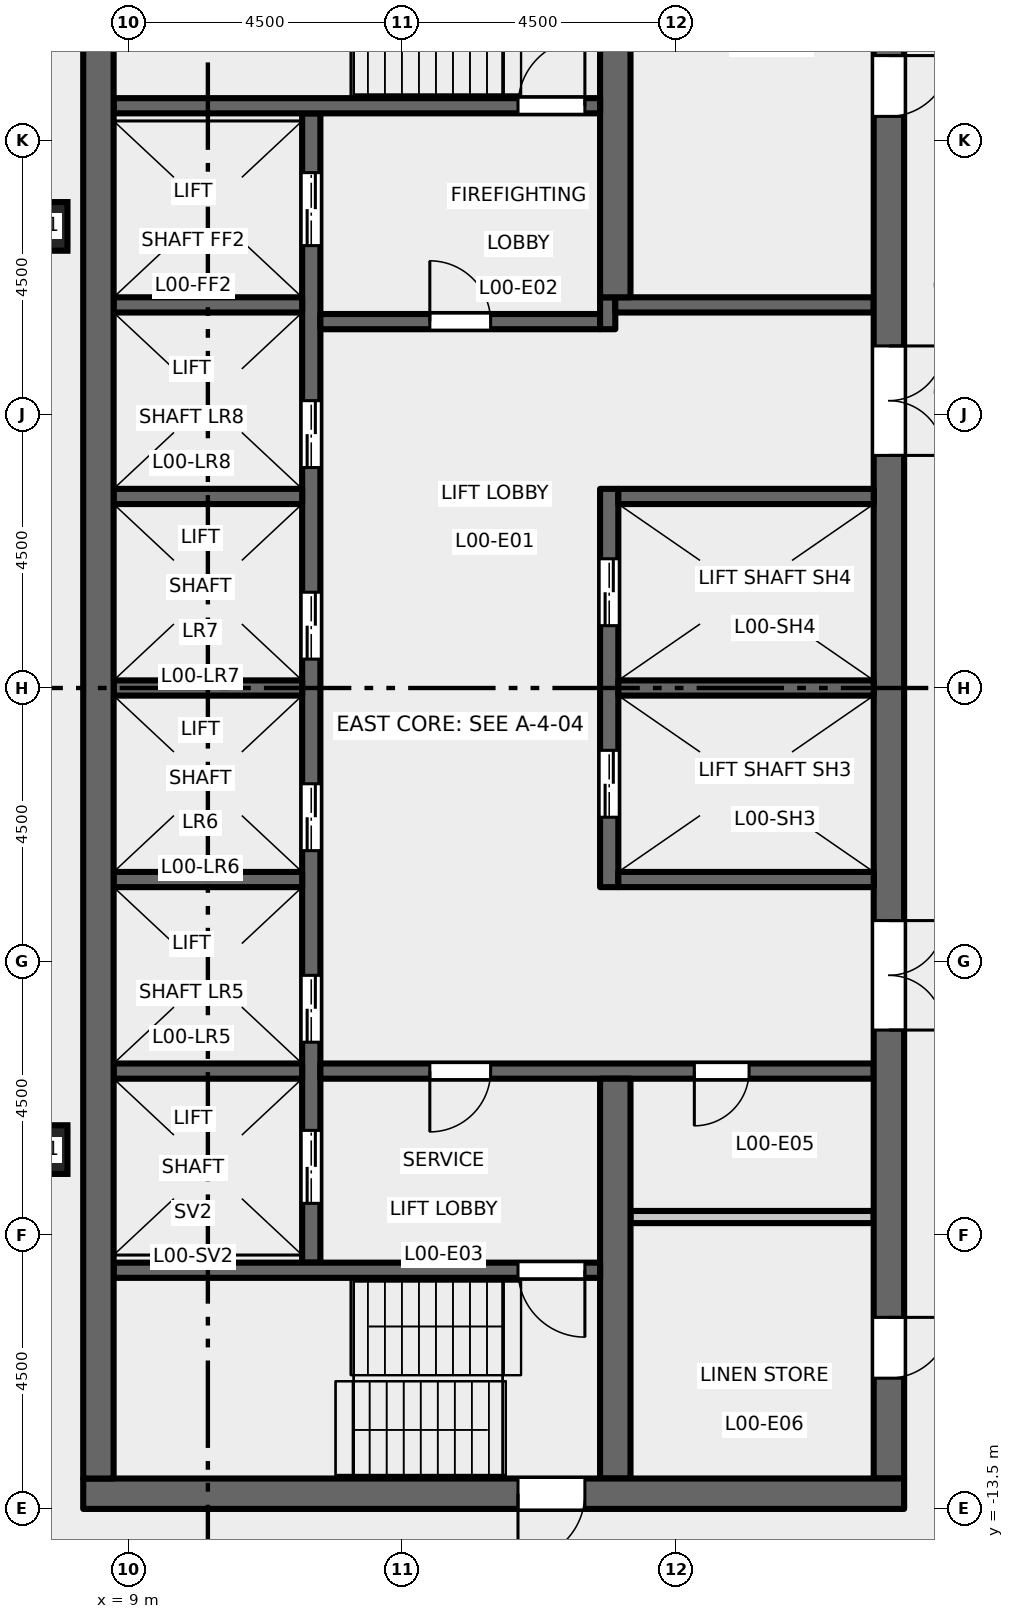
"""IFC4 building model, lengths in metres.
Left out: names, types, materials, properties, quantities, classifications, styles, units other than length and angle.
Written with IfcOpenShell. Run it as: python <this file> out.ifc"""

import sys

from ifc_helpers import new_model, si_unit, direction, frame, frame_2d, origin, origin_2d, place, context, subcontext, project, spatial, rectangle, hollow_rectangle, extrude, element, fill, save


model = new_model("IFC4")
c1 = context("Model", 3, precision=1e-05, world=origin(), true_north=direction((0.0, 1.0)))
c2 = subcontext(c1, "Body", "Model", "MODEL_VIEW")
j1 = project(units=[si_unit("LENGTHUNIT", "METRE"), si_unit("PLANEANGLEUNIT", "RADIAN")], contexts=[c1])
p1 = place(None, origin())
s1 = spatial("IfcSite", under=j1, at=p1, CompositionType="ELEMENT")
p2 = place(p1, origin())
s2 = spatial("IfcBuilding", under=s1, at=p2, CompositionType="ELEMENT")
p3 = place(p2, origin())
s3 = spatial("IfcBuildingStorey", under=s2, at=p3, CompositionType="ELEMENT", Elevation=0.0)
for number, where, z_axis, x_axis in (
    (1, (7.591, -7.591, 0.0), (0.0, 0.0, 1.0), (1.0, 0.0, 0.0)),
    (2, (7.591, 7.591, 0.0), (0.0, 0.0, 1.0), (1.0, 0.0, 0.0)),
):
    element("IfcColumn", number, at=place(p3, frame(where, z_axis=z_axis, x_axis=x_axis)), inside=s3, PredefinedType="COLUMN", context=c2, shape_type="SweptSolid", body=[
        extrude(hollow_rectangle(XDim=0.8, YDim=0.8, WallThickness=0.05, at=origin_2d()), origin(), (0.0, 0.0, 1.0), 7.2),
    ])
p4 = place(p3, frame((12.0, -9.45, 0.0), z_axis=(0.0, 0.0, 1.0), x_axis=(0.0, 1.0, 0.0)))
e3 = element("IfcWall", 3, at=p4, inside=s3, PredefinedType="SHEAR", context=c2, shape_type="SweptSolid", body=[
    extrude(rectangle(XDim=18.9, YDim=0.3, at=frame_2d((9.45, 0.0))), origin(), (0.0, 0.0, 1.0), 7.0),
])
p5 = place(p4, frame((3.625, 0.0, 0.0)))
e4 = element("IfcOpeningElement", 4, at=p5, cuts=e3, PredefinedType="OPENING", context=c2, shape_type="SweptSolid", body=[
    extrude(rectangle(XDim=1.1, YDim=2.1, at=frame_2d((0.55, 1.05))), frame((0.0, 0.16, 0.0), z_axis=(0.0, -1.0, 0.0), x_axis=(1.0, 0.0, 0.0)), (0.0, 0.0, 1.0), 0.32),
])
p6 = place(p4, frame((6.775, 0.0, 0.0)))
e5 = element("IfcOpeningElement", 5, at=p6, cuts=e3, PredefinedType="OPENING", context=c2, shape_type="SweptSolid", body=[
    extrude(rectangle(XDim=1.1, YDim=2.1, at=frame_2d((0.55, 1.05))), frame((0.0, 0.16, 0.0), z_axis=(0.0, -1.0, 0.0), x_axis=(1.0, 0.0, 0.0)), (0.0, 0.0, 1.0), 0.32),
])
p7 = place(p4, frame((9.925, 0.0, 0.0)))
e6 = element("IfcOpeningElement", 6, at=p7, cuts=e3, PredefinedType="OPENING", context=c2, shape_type="SweptSolid", body=[
    extrude(rectangle(XDim=1.1, YDim=2.1, at=frame_2d((0.55, 1.05))), frame((0.0, 0.16, 0.0), z_axis=(0.0, -1.0, 0.0), x_axis=(1.0, 0.0, 0.0)), (0.0, 0.0, 1.0), 0.32),
])
p8 = place(p4, frame((13.075, 0.0, 0.0)))
e7 = element("IfcOpeningElement", 7, at=p8, cuts=e3, PredefinedType="OPENING", context=c2, shape_type="SweptSolid", body=[
    extrude(rectangle(XDim=1.1, YDim=2.1, at=frame_2d((0.55, 1.05))), frame((0.0, 0.16, 0.0), z_axis=(0.0, -1.0, 0.0), x_axis=(1.0, 0.0, 0.0)), (0.0, 0.0, 1.0), 0.32),
])
p9 = place(p4, frame((16.725, 0.0, 0.0)))
e8 = element("IfcOpeningElement", 8, at=p9, cuts=e3, PredefinedType="OPENING", context=c2, shape_type="SweptSolid", body=[
    extrude(rectangle(XDim=1.2, YDim=2.1, at=frame_2d((0.6, 1.05))), frame((0.0, 0.16, 0.0), z_axis=(0.0, -1.0, 0.0), x_axis=(1.0, 0.0, 0.0)), (0.0, 0.0, 1.0), 0.32),
])
p10 = place(p4, frame((0.975, 0.0, 0.0)))
e9 = element("IfcOpeningElement", 9, at=p10, cuts=e3, PredefinedType="OPENING", context=c2, shape_type="SweptSolid", body=[
    extrude(rectangle(XDim=1.2, YDim=2.1, at=frame_2d((0.6, 1.05))), frame((0.0, 0.16, 0.0), z_axis=(0.0, -1.0, 0.0), x_axis=(1.0, 0.0, 0.0)), (0.0, 0.0, 1.0), 0.32),
])
p11 = place(p3, frame((12.15, 6.025, 0.0), z_axis=(0.0, 0.0, 1.0), x_axis=(1.0, 0.0, 0.0)))
e10 = element("IfcWall", 10, at=p11, inside=s3, PredefinedType="SHEAR", context=c2, shape_type="SweptSolid", body=[
    extrude(rectangle(XDim=4.6, YDim=0.25, at=frame_2d((2.3, 0.0))), origin(), (0.0, 0.0, 1.0), 7.0),
])
p12 = place(p11, frame((1.8, 0.0, 0.0)))
e11 = element("IfcOpeningElement", 11, at=p12, cuts=e10, PredefinedType="OPENING", context=c2, shape_type="SweptSolid", body=[
    extrude(rectangle(XDim=1.0, YDim=2.1, at=frame_2d((0.5, 1.05))), frame((0.0, 0.135, 0.0), z_axis=(0.0, -1.0, 0.0), x_axis=(1.0, 0.0, 0.0)), (0.0, 0.0, 1.0), 0.27),
])
p13 = place(p3, frame((16.875, 5.9, 0.0), z_axis=(0.0, 0.0, 1.0), x_axis=(0.0, 1.0, 0.0)))
e12 = element("IfcWall", 12, at=p13, inside=s3, PredefinedType="SHEAR", context=c2, shape_type="SweptSolid", body=[
    extrude(rectangle(XDim=0.525, YDim=0.25, at=frame_2d((0.263, 0.0))), origin(), (0.0, 0.0, 1.0), 7.0),
])
p14 = place(p3, frame((17.0, 6.3, 0.0), z_axis=(0.0, 0.0, 1.0), x_axis=(1.0, 0.0, 0.0)))
e13 = element("IfcWall", 13, at=p14, inside=s3, PredefinedType="SHEAR", context=c2, shape_type="SweptSolid", body=[
    extrude(rectangle(XDim=4.25, YDim=0.25, at=frame_2d((2.125, 0.0))), origin(), (0.0, 0.0, 1.0), 7.0),
])
p15 = place(p3, frame((12.15, -6.3, 0.0), z_axis=(0.0, 0.0, 1.0), x_axis=(1.0, 0.0, 0.0)))
e14 = element("IfcWall", 14, at=p15, inside=s3, PredefinedType="SHEAR", context=c2, shape_type="SweptSolid", body=[
    extrude(rectangle(XDim=9.1, YDim=0.25, at=frame_2d((4.55, 0.0))), origin(), (0.0, 0.0, 1.0), 7.0),
])
p16 = place(p15, frame((1.8, 0.0, 0.0)))
e15 = element("IfcOpeningElement", 15, at=p16, cuts=e14, PredefinedType="OPENING", context=c2, shape_type="SweptSolid", body=[
    extrude(rectangle(XDim=1.0, YDim=2.1, at=frame_2d((0.5, 1.05))), frame((0.0, 0.135, 0.0), z_axis=(0.0, -1.0, 0.0), x_axis=(1.0, 0.0, 0.0)), (0.0, 0.0, 1.0), 0.27),
])
p17 = place(p15, frame((6.15, 0.0, 0.0)))
e16 = element("IfcOpeningElement", 16, at=p17, cuts=e14, PredefinedType="OPENING", context=c2, shape_type="SweptSolid", body=[
    extrude(rectangle(XDim=0.9, YDim=2.1, at=frame_2d((0.45, 1.05))), frame((0.0, 0.135, 0.0), z_axis=(0.0, -1.0, 0.0), x_axis=(1.0, 0.0, 0.0)), (0.0, 0.0, 1.0), 0.27),
])
p18 = place(p3, frame((21.5, -13.0, 0.0), z_axis=(0.0, 0.0, 1.0), x_axis=(0.0, 1.0, 0.0)))
e17 = element("IfcWall", 17, at=p18, inside=s3, PredefinedType="SHEAR", context=c2, shape_type="SweptSolid", body=[
    extrude(rectangle(XDim=26.0, YDim=0.5, at=frame_2d((13.0, 0.0))), origin(), (0.0, 0.0, 1.0), 7.0),
])
p19 = place(p18, frame((16.825, 0.0, 0.0)))
e18 = element("IfcOpeningElement", 18, at=p19, cuts=e17, PredefinedType="OPENING", context=c2, shape_type="SweptSolid", body=[
    extrude(rectangle(XDim=1.8, YDim=2.1, at=frame_2d((0.9, 1.05))), frame((0.0, 0.26, 0.0), z_axis=(0.0, -1.0, 0.0), x_axis=(1.0, 0.0, 0.0)), (0.0, 0.0, 1.0), 0.52),
])
p20 = place(p18, frame((7.375, 0.0, 0.0)))
e19 = element("IfcOpeningElement", 19, at=p20, cuts=e17, PredefinedType="OPENING", context=c2, shape_type="SweptSolid", body=[
    extrude(rectangle(XDim=1.8, YDim=2.1, at=frame_2d((0.9, 1.05))), frame((0.0, 0.26, 0.0), z_axis=(0.0, -1.0, 0.0), x_axis=(1.0, 0.0, 0.0)), (0.0, 0.0, 1.0), 0.52),
])
p21 = place(p18, frame((22.4, 0.0, 0.0)))
e20 = element("IfcOpeningElement", 20, at=p21, cuts=e17, PredefinedType="OPENING", context=c2, shape_type="SweptSolid", body=[
    extrude(rectangle(XDim=1.0, YDim=2.1, at=frame_2d((0.5, 1.05))), frame((0.0, 0.26, 0.0), z_axis=(0.0, -1.0, 0.0), x_axis=(1.0, 0.0, 0.0)), (0.0, 0.0, 1.0), 0.52),
])
p22 = place(p18, frame((1.65, 0.0, 0.0)))
e21 = element("IfcOpeningElement", 21, at=p22, cuts=e17, PredefinedType="OPENING", context=c2, shape_type="SweptSolid", body=[
    extrude(rectangle(XDim=1.0, YDim=2.1, at=frame_2d((0.5, 1.05))), frame((0.0, 0.26, 0.0), z_axis=(0.0, -1.0, 0.0), x_axis=(1.0, 0.0, 0.0)), (0.0, 0.0, 1.0), 0.52),
])
p23 = place(p3, frame((17.25, -8.7, 0.0), z_axis=(0.0, 0.0, 1.0), x_axis=(1.0, 0.0, 0.0)))
e22 = element("IfcWall", 22, at=p23, inside=s3, PredefinedType="PARTITIONING", context=c2, shape_type="SweptSolid", body=[
    extrude(rectangle(XDim=4.0, YDim=0.2, at=frame_2d((2.0, 0.0))), origin(), (0.0, 0.0, 1.0), 7.0),
])
p24 = place(p3, frame((16.9, -3.275, 0.0), z_axis=(0.0, 0.0, 1.0), x_axis=(0.0, 1.0, 0.0)))
e23 = element("IfcWall", 23, at=p24, inside=s3, PredefinedType="SHEAR", context=c2, shape_type="SweptSolid", body=[
    extrude(rectangle(XDim=6.55, YDim=0.3, at=frame_2d((3.275, 0.0))), origin(), (0.0, 0.0, 1.0), 7.0),
])
p25 = place(p24, frame((1.15, 0.0, 0.0)))
e24 = element("IfcOpeningElement", 24, at=p25, cuts=e23, PredefinedType="OPENING", context=c2, shape_type="SweptSolid", body=[
    extrude(rectangle(XDim=1.1, YDim=2.1, at=frame_2d((0.55, 1.05))), frame((0.0, 0.16, 0.0), z_axis=(0.0, -1.0, 0.0), x_axis=(1.0, 0.0, 0.0)), (0.0, 0.0, 1.0), 0.32),
])
p26 = place(p24, frame((4.3, 0.0, 0.0)))
e25 = element("IfcOpeningElement", 25, at=p26, cuts=e23, PredefinedType="OPENING", context=c2, shape_type="SweptSolid", body=[
    extrude(rectangle(XDim=1.1, YDim=2.1, at=frame_2d((0.55, 1.05))), frame((0.0, 0.16, 0.0), z_axis=(0.0, -1.0, 0.0), x_axis=(1.0, 0.0, 0.0)), (0.0, 0.0, 1.0), 0.32),
])
for number, where, z_axis, x_axis in (
    (26, (17.05, 0.0, 0.0), (0.0, 0.0, 1.0), (1.0, 0.0, 0.0)),
    (27, (17.05, 3.15, 0.0), (0.0, 0.0, 1.0), (1.0, 0.0, 0.0)),
    (28, (17.05, -3.15, 0.0), (0.0, 0.0, 1.0), (1.0, 0.0, 0.0)),
):
    element("IfcWall", number, at=place(p3, frame(where, z_axis=z_axis, x_axis=x_axis)), inside=s3, PredefinedType="SHEAR", context=c2, shape_type="SweptSolid", body=[
        extrude(rectangle(XDim=4.2, YDim=0.25, at=frame_2d((2.1, 0.0))), origin(), (0.0, 0.0, 1.0), 7.0),
    ])
for number, where, z_axis, x_axis in (
    (29, (17.0, 6.425, 0.0), (0.0, 0.0, 1.0), (0.0, 1.0, 0.0)),
    (30, (17.0, -13.0, 0.0), (0.0, 0.0, 1.0), (0.0, 1.0, 0.0)),
):
    element("IfcWall", number, at=place(p3, frame(where, z_axis=z_axis, x_axis=x_axis)), inside=s3, PredefinedType="SHEAR", context=c2, shape_type="SweptSolid", body=[
        extrude(rectangle(XDim=6.575, YDim=0.5, at=frame_2d((3.288, 0.0))), origin(), (0.0, 0.0, 1.0), 7.0),
    ])
for number, where, z_axis, x_axis in (
    (31, (8.75, 0.0, 0.0), (0.0, 0.0, 1.0), (1.0, 0.0, 0.0)),
    (32, (8.75, 3.15, 0.0), (0.0, 0.0, 1.0), (1.0, 0.0, 0.0)),
    (33, (8.75, 6.3, 0.0), (0.0, 0.0, 1.0), (1.0, 0.0, 0.0)),
    (34, (8.75, -3.15, 0.0), (0.0, 0.0, 1.0), (1.0, 0.0, 0.0)),
    (35, (8.75, -6.3, 0.0), (0.0, 0.0, 1.0), (1.0, 0.0, 0.0)),
):
    element("IfcWall", number, at=place(p3, frame(where, z_axis=z_axis, x_axis=x_axis)), inside=s3, PredefinedType="SHEAR", context=c2, shape_type="SweptSolid", body=[
        extrude(rectangle(XDim=3.1, YDim=0.25, at=frame_2d((1.55, 0.0))), origin(), (0.0, 0.0, 1.0), 7.0),
    ])
p27 = place(p3, frame((8.75, 9.575, 0.0), z_axis=(0.0, 0.0, 1.0), x_axis=(1.0, 0.0, 0.0)))
e36 = element("IfcWall", 36, at=p27, inside=s3, PredefinedType="SHEAR", context=c2, shape_type="SweptSolid", body=[
    extrude(rectangle(XDim=8.0, YDim=0.25, at=frame_2d((4.0, 0.0))), origin(), (0.0, 0.0, 1.0), 7.0),
])
p28 = place(p27, frame((6.65, 0.0, 0.0)))
e37 = element("IfcOpeningElement", 37, at=p28, cuts=e36, PredefinedType="OPENING", context=c2, shape_type="SweptSolid", body=[
    extrude(rectangle(XDim=1.1, YDim=2.1, at=frame_2d((0.55, 1.05))), frame((0.0, 0.135, 0.0), z_axis=(0.0, -1.0, 0.0), x_axis=(1.0, 0.0, 0.0)), (0.0, 0.0, 1.0), 0.27),
])
p29 = place(p3, frame((8.75, -9.575, 0.0), z_axis=(0.0, 0.0, 1.0), x_axis=(1.0, 0.0, 0.0)))
e38 = element("IfcWall", 38, at=p29, inside=s3, PredefinedType="SHEAR", context=c2, shape_type="SweptSolid", body=[
    extrude(rectangle(XDim=8.0, YDim=0.25, at=frame_2d((4.0, 0.0))), origin(), (0.0, 0.0, 1.0), 7.0),
])
p30 = place(p29, frame((6.65, 0.0, 0.0)))
e39 = element("IfcOpeningElement", 39, at=p30, cuts=e38, PredefinedType="OPENING", context=c2, shape_type="SweptSolid", body=[
    extrude(rectangle(XDim=1.1, YDim=2.1, at=frame_2d((0.55, 1.05))), frame((0.0, 0.135, 0.0), z_axis=(0.0, -1.0, 0.0), x_axis=(1.0, 0.0, 0.0)), (0.0, 0.0, 1.0), 0.27),
])
p31 = place(p3, frame((8.25, -13.25, 0.0), z_axis=(0.0, 0.0, 1.0), x_axis=(1.0, 0.0, 0.0)))
e40 = element("IfcWall", 40, at=p31, inside=s3, PredefinedType="SHEAR", context=c2, shape_type="SweptSolid", body=[
    extrude(rectangle(XDim=13.5, YDim=0.5, at=frame_2d((6.75, 0.0))), origin(), (0.0, 0.0, 1.0), 7.0),
])
p32 = place(p31, frame((7.15, 0.0, 0.0)))
e41 = element("IfcOpeningElement", 41, at=p32, cuts=e40, PredefinedType="OPENING", context=c2, shape_type="SweptSolid", body=[
    extrude(rectangle(XDim=1.1, YDim=2.1, at=frame_2d((0.55, 1.05))), frame((0.0, 0.26, 0.0), z_axis=(0.0, -1.0, 0.0), x_axis=(1.0, 0.0, 0.0)), (0.0, 0.0, 1.0), 0.52),
])
p33 = place(p3, frame((8.5, -13.0, 0.0), z_axis=(0.0, 0.0, 1.0), x_axis=(0.0, 1.0, 0.0)))
e42 = element("IfcWall", 42, at=p33, inside=s3, PredefinedType="SHEAR", context=c2, shape_type="SweptSolid", body=[
    extrude(rectangle(XDim=26.0, YDim=0.5, at=frame_2d((13.0, 0.0))), origin(), (0.0, 0.0, 1.0), 7.0),
])
p34 = place(p12, origin())
e43 = element("IfcDoor", 43, at=p34, inside=s3, OperationType="SINGLE_SWING_RIGHT", PredefinedType="DOOR", context=c2, shape_type="SweptSolid", body=[
    extrude(rectangle(XDim=1.0, YDim=2.1, at=frame_2d((0.5, 1.05))), frame((0.0, 0.025, 0.0), z_axis=(0.0, -1.0, 0.0), x_axis=(1.0, 0.0, 0.0)), (0.0, 0.0, 1.0), 0.05),
])
fill(e11, e43)
p35 = place(p16, origin())
e44 = element("IfcDoor", 44, at=p35, inside=s3, OperationType="SINGLE_SWING_LEFT", PredefinedType="DOOR", context=c2, shape_type="SweptSolid", body=[
    extrude(rectangle(XDim=1.0, YDim=2.1, at=frame_2d((0.5, 1.05))), frame((0.0, 0.025, 0.0), z_axis=(0.0, -1.0, 0.0), x_axis=(1.0, 0.0, 0.0)), (0.0, 0.0, 1.0), 0.05),
])
fill(e15, e44)
p36 = place(p28, origin())
e45 = element("IfcDoor", 45, at=p36, inside=s3, OperationType="SINGLE_SWING_LEFT", PredefinedType="DOOR", context=c2, shape_type="SweptSolid", body=[
    extrude(rectangle(XDim=1.1, YDim=2.1, at=frame_2d((0.55, 1.05))), frame((0.0, 0.025, 0.0), z_axis=(0.0, -1.0, 0.0), x_axis=(1.0, 0.0, 0.0)), (0.0, 0.0, 1.0), 0.05),
])
fill(e37, e45)
p37 = place(p30, origin())
e46 = element("IfcDoor", 46, at=p37, inside=s3, OperationType="SINGLE_SWING_RIGHT", PredefinedType="DOOR", context=c2, shape_type="SweptSolid", body=[
    extrude(rectangle(XDim=1.1, YDim=2.1, at=frame_2d((0.55, 1.05))), frame((0.0, 0.025, 0.0), z_axis=(0.0, -1.0, 0.0), x_axis=(1.0, 0.0, 0.0)), (0.0, 0.0, 1.0), 0.05),
])
fill(e39, e46)
p38 = place(p19, frame((1.8, 0.0, 0.0), z_axis=(0.0, 0.0, 1.0), x_axis=(-1.0, 0.0, 0.0)))
e47 = element("IfcDoor", 47, at=p38, inside=s3, OperationType="DOUBLE_DOOR_DOUBLE_SWING", PredefinedType="DOOR", context=c2, shape_type="SweptSolid", body=[
    extrude(rectangle(XDim=1.8, YDim=2.1, at=frame_2d((0.9, 1.05))), frame((0.0, 0.025, 0.0), z_axis=(0.0, -1.0, 0.0), x_axis=(1.0, 0.0, 0.0)), (0.0, 0.0, 1.0), 0.05),
])
fill(e18, e47)
p39 = place(p20, frame((1.8, 0.0, 0.0), z_axis=(0.0, 0.0, 1.0), x_axis=(-1.0, 0.0, 0.0)))
e48 = element("IfcDoor", 48, at=p39, inside=s3, OperationType="DOUBLE_DOOR_DOUBLE_SWING", PredefinedType="DOOR", context=c2, shape_type="SweptSolid", body=[
    extrude(rectangle(XDim=1.8, YDim=2.1, at=frame_2d((0.9, 1.05))), frame((0.0, 0.025, 0.0), z_axis=(0.0, -1.0, 0.0), x_axis=(1.0, 0.0, 0.0)), (0.0, 0.0, 1.0), 0.05),
])
fill(e19, e48)
p40 = place(p32, frame((1.1, 0.0, 0.0), z_axis=(0.0, 0.0, 1.0), x_axis=(-1.0, 0.0, 0.0)))
e49 = element("IfcDoor", 49, at=p40, inside=s3, OperationType="SINGLE_SWING_LEFT", PredefinedType="DOOR", context=c2, shape_type="SweptSolid", body=[
    extrude(rectangle(XDim=1.1, YDim=2.1, at=frame_2d((0.55, 1.05))), frame((0.0, 0.025, 0.0), z_axis=(0.0, -1.0, 0.0), x_axis=(1.0, 0.0, 0.0)), (0.0, 0.0, 1.0), 0.05),
])
fill(e41, e49)
p41 = place(p5, origin())
e50 = element("IfcDoor", 50, at=p41, inside=s3, OperationType="DOUBLE_DOOR_SLIDING", PredefinedType="DOOR", context=c2, shape_type="SweptSolid", body=[
    extrude(rectangle(XDim=1.1, YDim=2.1, at=frame_2d((0.55, 1.05))), frame((0.0, 0.025, 0.0), z_axis=(0.0, -1.0, 0.0), x_axis=(1.0, 0.0, 0.0)), (0.0, 0.0, 1.0), 0.05),
])
fill(e4, e50)
p42 = place(p6, origin())
e51 = element("IfcDoor", 51, at=p42, inside=s3, OperationType="DOUBLE_DOOR_SLIDING", PredefinedType="DOOR", context=c2, shape_type="SweptSolid", body=[
    extrude(rectangle(XDim=1.1, YDim=2.1, at=frame_2d((0.55, 1.05))), frame((0.0, 0.025, 0.0), z_axis=(0.0, -1.0, 0.0), x_axis=(1.0, 0.0, 0.0)), (0.0, 0.0, 1.0), 0.05),
])
fill(e5, e51)
p43 = place(p7, origin())
e52 = element("IfcDoor", 52, at=p43, inside=s3, OperationType="DOUBLE_DOOR_SLIDING", PredefinedType="DOOR", context=c2, shape_type="SweptSolid", body=[
    extrude(rectangle(XDim=1.1, YDim=2.1, at=frame_2d((0.55, 1.05))), frame((0.0, 0.025, 0.0), z_axis=(0.0, -1.0, 0.0), x_axis=(1.0, 0.0, 0.0)), (0.0, 0.0, 1.0), 0.05),
])
fill(e6, e52)
p44 = place(p8, origin())
e53 = element("IfcDoor", 53, at=p44, inside=s3, OperationType="DOUBLE_DOOR_SLIDING", PredefinedType="DOOR", context=c2, shape_type="SweptSolid", body=[
    extrude(rectangle(XDim=1.1, YDim=2.1, at=frame_2d((0.55, 1.05))), frame((0.0, 0.025, 0.0), z_axis=(0.0, -1.0, 0.0), x_axis=(1.0, 0.0, 0.0)), (0.0, 0.0, 1.0), 0.05),
])
fill(e7, e53)
p45 = place(p25, origin())
e54 = element("IfcDoor", 54, at=p45, inside=s3, OperationType="DOUBLE_DOOR_SLIDING", PredefinedType="DOOR", context=c2, shape_type="SweptSolid", body=[
    extrude(rectangle(XDim=1.1, YDim=2.1, at=frame_2d((0.55, 1.05))), frame((0.0, 0.025, 0.0), z_axis=(0.0, -1.0, 0.0), x_axis=(1.0, 0.0, 0.0)), (0.0, 0.0, 1.0), 0.05),
])
fill(e24, e54)
p46 = place(p26, origin())
e55 = element("IfcDoor", 55, at=p46, inside=s3, OperationType="DOUBLE_DOOR_SLIDING", PredefinedType="DOOR", context=c2, shape_type="SweptSolid", body=[
    extrude(rectangle(XDim=1.1, YDim=2.1, at=frame_2d((0.55, 1.05))), frame((0.0, 0.025, 0.0), z_axis=(0.0, -1.0, 0.0), x_axis=(1.0, 0.0, 0.0)), (0.0, 0.0, 1.0), 0.05),
])
fill(e25, e55)
p47 = place(p9, origin())
e56 = element("IfcDoor", 56, at=p47, inside=s3, OperationType="DOUBLE_DOOR_SLIDING", PredefinedType="DOOR", context=c2, shape_type="SweptSolid", body=[
    extrude(rectangle(XDim=1.2, YDim=2.1, at=frame_2d((0.6, 1.05))), frame((0.0, 0.025, 0.0), z_axis=(0.0, -1.0, 0.0), x_axis=(1.0, 0.0, 0.0)), (0.0, 0.0, 1.0), 0.05),
])
fill(e8, e56)
p48 = place(p10, origin())
e57 = element("IfcDoor", 57, at=p48, inside=s3, OperationType="DOUBLE_DOOR_SLIDING", PredefinedType="DOOR", context=c2, shape_type="SweptSolid", body=[
    extrude(rectangle(XDim=1.2, YDim=2.1, at=frame_2d((0.6, 1.05))), frame((0.0, 0.025, 0.0), z_axis=(0.0, -1.0, 0.0), x_axis=(1.0, 0.0, 0.0)), (0.0, 0.0, 1.0), 0.05),
])
fill(e9, e57)
p49 = place(p21, frame((1.0, 0.0, 0.0), z_axis=(0.0, 0.0, 1.0), x_axis=(-1.0, 0.0, 0.0)))
e58 = element("IfcDoor", 58, at=p49, inside=s3, OperationType="SINGLE_SWING_RIGHT", PredefinedType="DOOR", context=c2, shape_type="SweptSolid", body=[
    extrude(rectangle(XDim=1.0, YDim=2.1, at=frame_2d((0.5, 1.05))), frame((0.0, 0.025, 0.0), z_axis=(0.0, -1.0, 0.0), x_axis=(1.0, 0.0, 0.0)), (0.0, 0.0, 1.0), 0.05),
])
fill(e20, e58)
p50 = place(p17, origin())
e59 = element("IfcDoor", 59, at=p50, inside=s3, OperationType="SINGLE_SWING_LEFT", PredefinedType="DOOR", context=c2, shape_type="SweptSolid", body=[
    extrude(rectangle(XDim=0.9, YDim=2.1, at=frame_2d((0.45, 1.05))), frame((0.0, 0.025, 0.0), z_axis=(0.0, -1.0, 0.0), x_axis=(1.0, 0.0, 0.0)), (0.0, 0.0, 1.0), 0.05),
])
fill(e16, e59)
p51 = place(p22, frame((1.0, 0.0, 0.0), z_axis=(0.0, 0.0, 1.0), x_axis=(-1.0, 0.0, 0.0)))
e60 = element("IfcDoor", 60, at=p51, inside=s3, OperationType="SINGLE_SWING_RIGHT", PredefinedType="DOOR", context=c2, shape_type="SweptSolid", body=[
    extrude(rectangle(XDim=1.0, YDim=2.1, at=frame_2d((0.5, 1.05))), frame((0.0, 0.025, 0.0), z_axis=(0.0, -1.0, 0.0), x_axis=(1.0, 0.0, 0.0)), (0.0, 0.0, 1.0), 0.05),
])
fill(e21, e60)
save(model, sys.argv[1])
